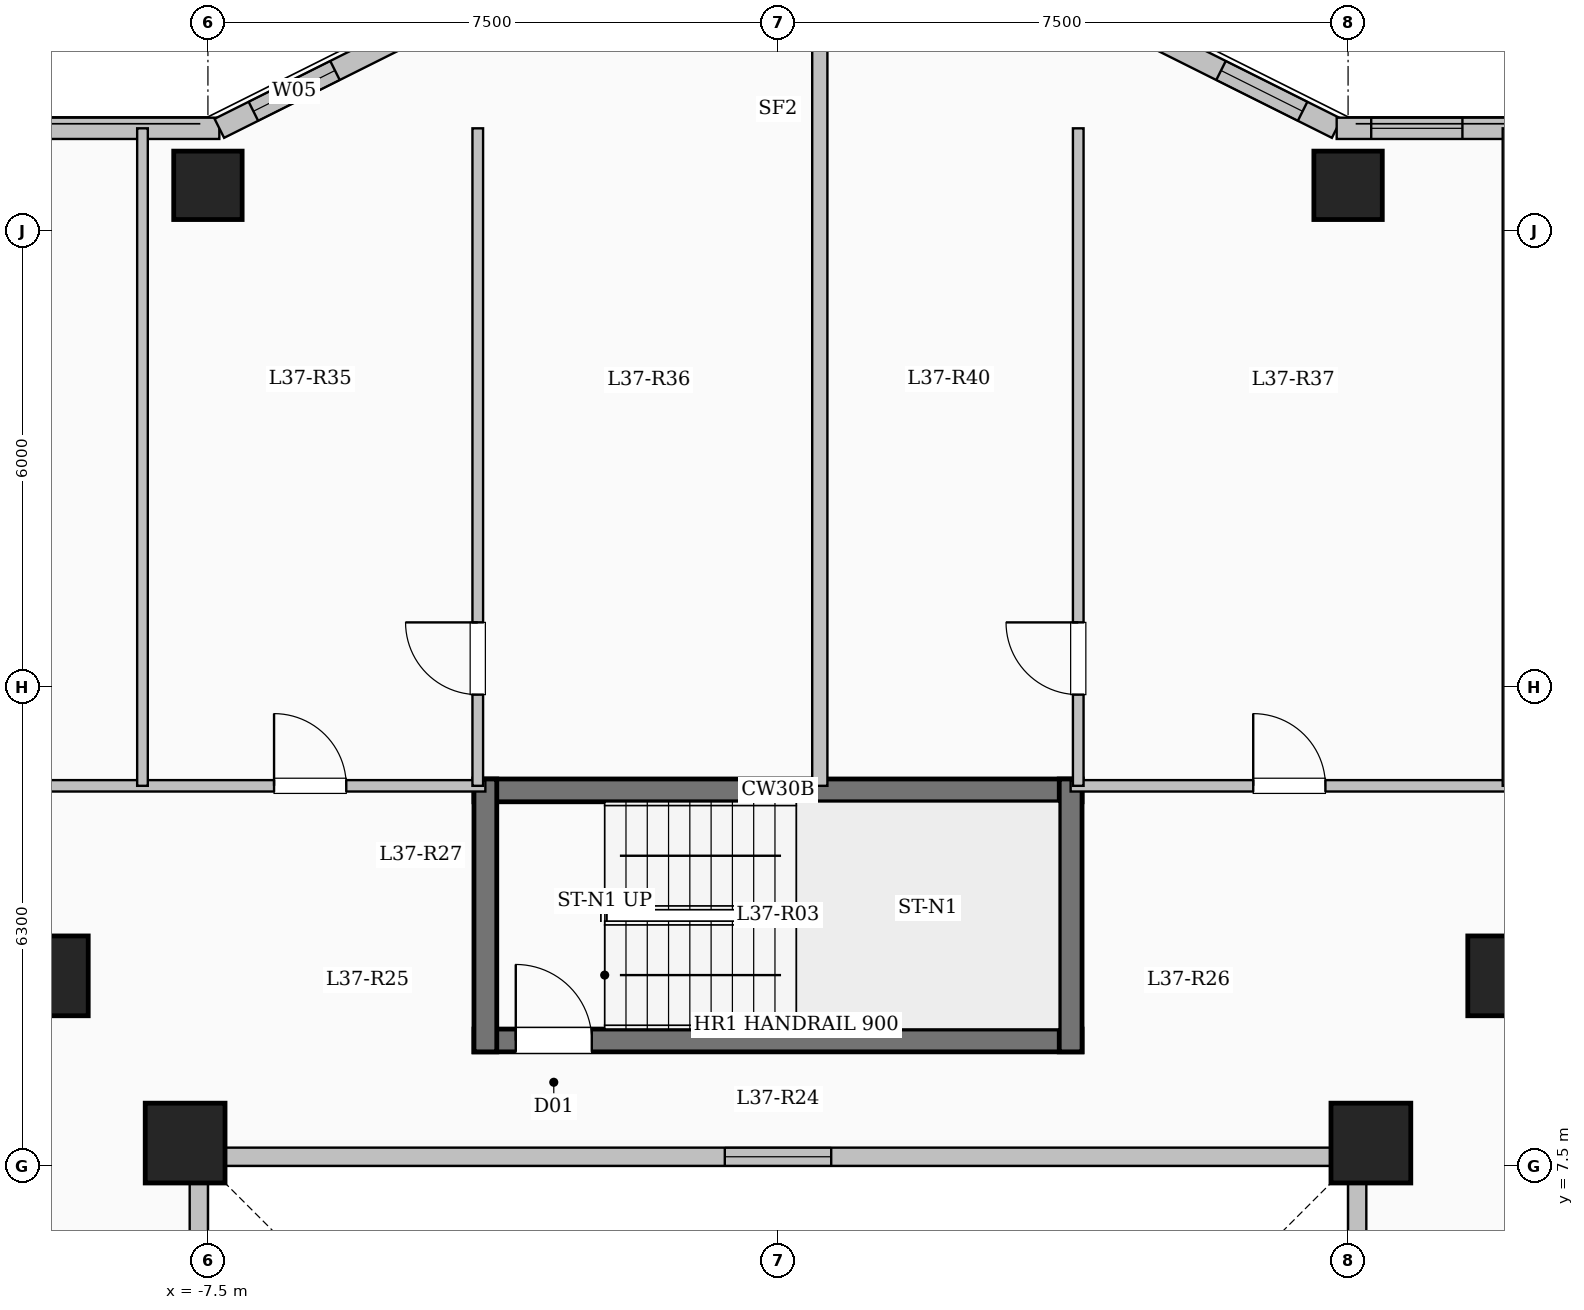
"""IFC4 building model, lengths in metres.
Left out: names, types, materials, properties, quantities, classifications, styles, units other than length and angle.
Written with IfcOpenShell. Run it as: python <this file> out.ifc"""

import sys

from ifc_helpers import new_model, si_unit, direction, frame, frame_2d, origin, origin_2d, place, context, subcontext, project, spatial, rectangle, extrude, element, fill, save


model = new_model("IFC4")
c1 = context("Model", 3, precision=1e-05, world=origin(), true_north=direction((0.0, 1.0)))
c2 = subcontext(c1, "Body", "Model", "MODEL_VIEW")
j1 = project(units=[si_unit("LENGTHUNIT", "METRE"), si_unit("PLANEANGLEUNIT", "RADIAN")], contexts=[c1])
p1 = place(None, origin())
s1 = spatial("IfcSite", under=j1, at=p1, CompositionType="ELEMENT")
p2 = place(p1, origin())
s2 = spatial("IfcBuilding", under=s1, at=p2, CompositionType="ELEMENT")
p3 = place(p2, frame((0.0, 0.0, 139.3)))
s3 = spatial("IfcBuildingStorey", under=s2, at=p3, CompositionType="ELEMENT", Elevation=139.3)
for number, where, z_axis, x_axis in (
    (1, (-7.8, 7.8, 0.0), (0.0, 0.0, 1.0), (1.0, 0.0, 0.0)),
    (2, (7.8, 7.8, 0.0), (0.0, 0.0, 1.0), (1.0, 0.0, 0.0)),
    (3, (-9.6, 10.0, 0.0), (0.0, 0.0, 1.0), (1.0, 0.0, 0.0)),
    (4, (9.6, 10.0, 0.0), (0.0, 0.0, 1.0), (1.0, 0.0, 0.0)),
):
    element("IfcColumn", number, at=place(p3, frame(where, z_axis=z_axis, x_axis=x_axis)), inside=s3, PredefinedType="COLUMN", context=c2, shape_type="SweptSolid", body=[
        extrude(rectangle(XDim=1.05, YDim=1.05, at=origin_2d()), origin(), (0.0, 0.0, 1.0), 3.35),
    ])
for number, where, z_axis, x_axis in (
    (5, (-7.5, 20.4, 0.0), (0.0, 0.0, 1.0), (1.0, 0.0, 0.0)),
    (6, (7.5, 20.4, 0.0), (0.0, 0.0, 1.0), (1.0, 0.0, 0.0)),
):
    element("IfcColumn", number, at=place(p3, frame(where, z_axis=z_axis, x_axis=x_axis)), inside=s3, PredefinedType="COLUMN", context=c2, shape_type="SweptSolid", body=[
        extrude(rectangle(XDim=0.9, YDim=0.9, at=origin_2d()), origin(), (0.0, 0.0, 1.0), 3.35),
    ])
p4 = place(p3, frame((7.62, -7.62, 0.0), z_axis=(0.0, 0.0, 1.0), x_axis=(0.0, 1.0, 0.0)))
e7 = element("IfcWall", 7, at=p4, inside=s3, PredefinedType="SOLIDWALL", context=c2, shape_type="SweptSolid", body=[
    extrude(rectangle(XDim=15.24, YDim=0.24, at=frame_2d((7.62, 0.0))), origin(), (0.0, 0.0, 1.0), 3.1),
])
p5 = place(p4, frame((6.92, 0.0, 0.95)))
e8 = element("IfcOpeningElement", 8, at=p5, cuts=e7, PredefinedType="OPENING", context=c2, shape_type="SweptSolid", body=[
    extrude(rectangle(XDim=1.4, YDim=1.5, at=frame_2d((0.7, 0.75))), frame((0.0, 0.13, 0.0), z_axis=(0.0, -1.0, 0.0), x_axis=(1.0, 0.0, 0.0)), (0.0, 0.0, 1.0), 0.26),
])
p6 = place(p3, frame((7.62, 7.62, 0.0), z_axis=(0.0, 0.0, 1.0), x_axis=(-1.0, 0.0, 0.0)))
e9 = element("IfcWall", 9, at=p6, inside=s3, PredefinedType="SOLIDWALL", context=c2, shape_type="SweptSolid", body=[
    extrude(rectangle(XDim=15.24, YDim=0.24, at=frame_2d((7.62, 0.0))), origin(), (0.0, 0.0, 1.0), 3.1),
])
p7 = place(p6, frame((6.92, 0.0, 0.95)))
e10 = element("IfcOpeningElement", 10, at=p7, cuts=e9, PredefinedType="OPENING", context=c2, shape_type="SweptSolid", body=[
    extrude(rectangle(XDim=1.4, YDim=1.5, at=frame_2d((0.7, 0.75))), frame((0.0, 0.13, 0.0), z_axis=(0.0, -1.0, 0.0), x_axis=(1.0, 0.0, 0.0)), (0.0, 0.0, 1.0), 0.26),
])
p8 = place(p3, frame((-7.62, 7.62, 0.0), z_axis=(0.0, 0.0, 1.0), x_axis=(0.0, -1.0, 0.0)))
e11 = element("IfcWall", 11, at=p8, inside=s3, PredefinedType="SOLIDWALL", context=c2, shape_type="SweptSolid", body=[
    extrude(rectangle(XDim=15.24, YDim=0.24, at=frame_2d((7.62, 0.0))), origin(), (0.0, 0.0, 1.0), 3.1),
])
p9 = place(p8, frame((6.92, 0.0, 0.95)))
e12 = element("IfcOpeningElement", 12, at=p9, cuts=e11, PredefinedType="OPENING", context=c2, shape_type="SweptSolid", body=[
    extrude(rectangle(XDim=1.4, YDim=1.5, at=frame_2d((0.7, 0.75))), frame((0.0, 0.13, 0.0), z_axis=(0.0, -1.0, 0.0), x_axis=(1.0, 0.0, 0.0)), (0.0, 0.0, 1.0), 0.26),
])
p10 = place(p3, frame((-19.65, 21.15, 0.0), z_axis=(0.0, 0.0, 1.0), x_axis=(1.0, 0.0, 0.0)))
e13 = element("IfcWall", 13, at=p10, inside=s3, PredefinedType="SOLIDWALL", context=c2, shape_type="SweptSolid", body=[
    extrude(rectangle(XDim=12.3, YDim=0.28, at=frame_2d((6.15, 0.0))), origin(), (0.0, 0.0, 1.0), 3.1),
])
p11 = place(p10, frame((1.862, 0.0, 0.9)))
e14 = element("IfcOpeningElement", 14, at=p11, cuts=e13, PredefinedType="OPENING", context=c2, shape_type="SweptSolid", body=[
    extrude(rectangle(XDim=2.0, YDim=1.7, at=frame_2d((1.0, 0.85))), frame((0.0, 0.15, 0.0), z_axis=(0.0, -1.0, 0.0), x_axis=(1.0, 0.0, 0.0)), (0.0, 0.0, 1.0), 0.3),
])
p12 = place(p10, frame((7.485, 0.0, 0.9)))
e15 = element("IfcOpeningElement", 15, at=p12, cuts=e13, PredefinedType="OPENING", context=c2, shape_type="SweptSolid", body=[
    extrude(rectangle(XDim=2.0, YDim=1.7, at=frame_2d((1.0, 0.85))), frame((0.0, 0.15, 0.0), z_axis=(0.0, -1.0, 0.0), x_axis=(1.0, 0.0, 0.0)), (0.0, 0.0, 1.0), 0.3),
])
p13 = place(p3, frame((-7.35, 21.15, 0.0), z_axis=(0.0, 0.0, 1.0), x_axis=(0.894427191, 0.4472135955, 0.0)))
e16 = element("IfcWall", 16, at=p13, inside=s3, PredefinedType="SOLIDWALL", context=c2, shape_type="SweptSolid", body=[
    extrude(rectangle(XDim=3.354, YDim=0.28, at=frame_2d((1.677, 0.0))), origin(), (0.0, 0.0, 1.0), 3.1),
])
p14 = place(p13, frame((0.501, 0.0, 0.95)))
e17 = element("IfcOpeningElement", 17, at=p14, cuts=e16, PredefinedType="OPENING", context=c2, shape_type="SweptSolid", body=[
    extrude(rectangle(XDim=1.2, YDim=1.5, at=frame_2d((0.6, 0.75))), frame((0.0, 0.15, 0.0), z_axis=(0.0, -1.0, 0.0), x_axis=(1.0, 0.0, 0.0)), (0.0, 0.0, 1.0), 0.3),
])
p15 = place(p3, frame((4.35, 22.65, 0.0), z_axis=(0.0, 0.0, 1.0), x_axis=(0.894427191, -0.4472135955, 0.0)))
e18 = element("IfcWall", 18, at=p15, inside=s3, PredefinedType="SOLIDWALL", context=c2, shape_type="SweptSolid", body=[
    extrude(rectangle(XDim=3.354, YDim=0.28, at=frame_2d((1.677, 0.0))), origin(), (0.0, 0.0, 1.0), 3.1),
])
p16 = place(p15, frame((1.653, 0.0, 0.95)))
e19 = element("IfcOpeningElement", 19, at=p16, cuts=e18, PredefinedType="OPENING", context=c2, shape_type="SweptSolid", body=[
    extrude(rectangle(XDim=1.2, YDim=1.5, at=frame_2d((0.6, 0.75))), frame((0.0, 0.15, 0.0), z_axis=(0.0, -1.0, 0.0), x_axis=(1.0, 0.0, 0.0)), (0.0, 0.0, 1.0), 0.3),
])
p17 = place(p3, frame((7.35, 21.15, 0.0), z_axis=(0.0, 0.0, 1.0), x_axis=(1.0, 0.0, 0.0)))
e20 = element("IfcWall", 20, at=p17, inside=s3, PredefinedType="SOLIDWALL", context=c2, shape_type="SweptSolid", body=[
    extrude(rectangle(XDim=12.3, YDim=0.28, at=frame_2d((6.15, 0.0))), origin(), (0.0, 0.0, 1.0), 3.1),
])
p18 = place(p17, frame((0.454, 0.0, 0.95)))
e21 = element("IfcOpeningElement", 21, at=p18, cuts=e20, PredefinedType="OPENING", context=c2, shape_type="SweptSolid", body=[
    extrude(rectangle(XDim=1.2, YDim=1.5, at=frame_2d((0.6, 0.75))), frame((0.0, 0.15, 0.0), z_axis=(0.0, -1.0, 0.0), x_axis=(1.0, 0.0, 0.0)), (0.0, 0.0, 1.0), 0.3),
])
p19 = place(p17, frame((4.045, 0.0, 0.9)))
e22 = element("IfcOpeningElement", 22, at=p19, cuts=e20, PredefinedType="OPENING", context=c2, shape_type="SweptSolid", body=[
    extrude(rectangle(XDim=2.0, YDim=1.7, at=frame_2d((1.0, 0.85))), frame((0.0, 0.15, 0.0), z_axis=(0.0, -1.0, 0.0), x_axis=(1.0, 0.0, 0.0)), (0.0, 0.0, 1.0), 0.3),
])
p20 = place(p17, frame((9.066, 0.0, 0.9)))
e23 = element("IfcOpeningElement", 23, at=p20, cuts=e20, PredefinedType="OPENING", context=c2, shape_type="SweptSolid", body=[
    extrude(rectangle(XDim=2.0, YDim=1.7, at=frame_2d((1.0, 0.85))), frame((0.0, 0.15, 0.0), z_axis=(0.0, -1.0, 0.0), x_axis=(1.0, 0.0, 0.0)), (0.0, 0.0, 1.0), 0.3),
])
p21 = place(p3, frame((-4.0, 12.44, 0.0), z_axis=(0.0, 0.0, 1.0), x_axis=(1.0, 0.0, 0.0)))
e24 = element("IfcWall", 24, at=p21, inside=s3, PredefinedType="SHEAR", context=c2, shape_type="SweptSolid", body=[
    extrude(rectangle(XDim=8.0, YDim=0.3, at=frame_2d((4.0, 0.0))), origin(), (0.0, 0.0, 1.0), 3.35),
])
p22 = place(p3, frame((-4.0, 9.15, 0.0), z_axis=(0.0, 0.0, 1.0), x_axis=(1.0, 0.0, 0.0)))
e25 = element("IfcWall", 25, at=p22, inside=s3, PredefinedType="SHEAR", context=c2, shape_type="SweptSolid", body=[
    extrude(rectangle(XDim=8.0, YDim=0.3, at=frame_2d((4.0, 0.0))), origin(), (0.0, 0.0, 1.0), 3.35),
])
p23 = place(p22, frame((0.55, 0.0, 0.0)))
e26 = element("IfcOpeningElement", 26, at=p23, cuts=e25, PredefinedType="OPENING", context=c2, shape_type="SweptSolid", body=[
    extrude(rectangle(XDim=1.0, YDim=2.15, at=frame_2d((0.5, 1.075))), frame((0.0, 0.16, 0.0), z_axis=(0.0, -1.0, 0.0), x_axis=(1.0, 0.0, 0.0)), (0.0, 0.0, 1.0), 0.32),
])
for number, where, z_axis, x_axis in (
    (27, (-3.85, 9.0, 0.0), (0.0, 0.0, 1.0), (0.0, 1.0, 0.0)),
    (28, (3.85, 9.0, 0.0), (0.0, 0.0, 1.0), (0.0, 1.0, 0.0)),
):
    element("IfcWall", number, at=place(p3, frame(where, z_axis=z_axis, x_axis=x_axis)), inside=s3, PredefinedType="SHEAR", context=c2, shape_type="SweptSolid", body=[
        extrude(rectangle(XDim=3.59, YDim=0.3, at=frame_2d((1.795, 0.0))), origin(), (0.0, 0.0, 1.0), 3.35),
    ])
p24 = place(p3, frame((-19.55, 12.5, 0.0), z_axis=(0.0, 0.0, 1.0), x_axis=(1.0, 0.0, 0.0)))
e29 = element("IfcWall", 29, at=p24, inside=s3, PredefinedType="PARTITIONING", context=c2, shape_type="SweptSolid", body=[
    extrude(rectangle(XDim=15.7, YDim=0.15, at=frame_2d((7.85, 0.0))), origin(), (0.0, 0.0, 1.0), 3.1),
])
p25 = place(p24, frame((2.292, 0.0, 0.0)))
e30 = element("IfcOpeningElement", 30, at=p25, cuts=e29, PredefinedType="OPENING", context=c2, shape_type="SweptSolid", body=[
    extrude(rectangle(XDim=0.95, YDim=2.15, at=frame_2d((0.475, 1.075))), frame((0.0, 0.085, 0.0), z_axis=(0.0, -1.0, 0.0), x_axis=(1.0, 0.0, 0.0)), (0.0, 0.0, 1.0), 0.17),
])
p26 = place(p24, frame((7.917, 0.0, 0.0)))
e31 = element("IfcOpeningElement", 31, at=p26, cuts=e29, PredefinedType="OPENING", context=c2, shape_type="SweptSolid", body=[
    extrude(rectangle(XDim=0.95, YDim=2.15, at=frame_2d((0.475, 1.075))), frame((0.0, 0.085, 0.0), z_axis=(0.0, -1.0, 0.0), x_axis=(1.0, 0.0, 0.0)), (0.0, 0.0, 1.0), 0.17),
])
p27 = place(p24, frame((12.92, 0.0, 0.0)))
e32 = element("IfcOpeningElement", 32, at=p27, cuts=e29, PredefinedType="OPENING", context=c2, shape_type="SweptSolid", body=[
    extrude(rectangle(XDim=0.95, YDim=2.15, at=frame_2d((0.475, 1.075))), frame((0.0, 0.085, 0.0), z_axis=(0.0, -1.0, 0.0), x_axis=(1.0, 0.0, 0.0)), (0.0, 0.0, 1.0), 0.17),
])
p28 = place(p3, frame((3.85, 12.5, 0.0), z_axis=(0.0, 0.0, 1.0), x_axis=(1.0, 0.0, 0.0)))
e33 = element("IfcWall", 33, at=p28, inside=s3, PredefinedType="PARTITIONING", context=c2, shape_type="SweptSolid", body=[
    extrude(rectangle(XDim=15.7, YDim=0.15, at=frame_2d((7.85, 0.0))), origin(), (0.0, 0.0, 1.0), 3.1),
])
p29 = place(p28, frame((2.402, 0.0, 0.0)))
e34 = element("IfcOpeningElement", 34, at=p29, cuts=e33, PredefinedType="OPENING", context=c2, shape_type="SweptSolid", body=[
    extrude(rectangle(XDim=0.95, YDim=2.15, at=frame_2d((0.475, 1.075))), frame((0.0, 0.085, 0.0), z_axis=(0.0, -1.0, 0.0), x_axis=(1.0, 0.0, 0.0)), (0.0, 0.0, 1.0), 0.17),
])
p30 = place(p28, frame((8.026, 0.0, 0.0)))
e35 = element("IfcOpeningElement", 35, at=p30, cuts=e33, PredefinedType="OPENING", context=c2, shape_type="SweptSolid", body=[
    extrude(rectangle(XDim=0.95, YDim=2.15, at=frame_2d((0.475, 1.075))), frame((0.0, 0.085, 0.0), z_axis=(0.0, -1.0, 0.0), x_axis=(1.0, 0.0, 0.0)), (0.0, 0.0, 1.0), 0.17),
])
p31 = place(p28, frame((13.03, 0.0, 0.0)))
e36 = element("IfcOpeningElement", 36, at=p31, cuts=e33, PredefinedType="OPENING", context=c2, shape_type="SweptSolid", body=[
    extrude(rectangle(XDim=0.95, YDim=2.15, at=frame_2d((0.475, 1.075))), frame((0.0, 0.085, 0.0), z_axis=(0.0, -1.0, 0.0), x_axis=(1.0, 0.0, 0.0)), (0.0, 0.0, 1.0), 0.17),
])
p32 = place(p3, frame((0.55, 12.5, 0.0), z_axis=(0.0, 0.0, 1.0), x_axis=(0.0, 1.0, 0.0)))
e37 = element("IfcWall", 37, at=p32, inside=s3, PredefinedType="SOLIDWALL", context=c2, shape_type="SweptSolid", body=[
    extrude(rectangle(XDim=10.18, YDim=0.2, at=frame_2d((5.09, 0.0))), origin(), (0.0, 0.0, 1.0), 3.1),
])
p33 = place(p3, frame((-3.95, 12.5, 0.0), z_axis=(0.0, 0.0, 1.0), x_axis=(0.0, 1.0, 0.0)))
e38 = element("IfcWall", 38, at=p33, inside=s3, PredefinedType="PARTITIONING", context=c2, shape_type="SweptSolid", body=[
    extrude(rectangle(XDim=8.65, YDim=0.14, at=frame_2d((4.325, 0.0))), origin(), (0.0, 0.0, 1.0), 3.1),
])
p34 = place(p33, frame((1.2, 0.0, 0.0)))
e39 = element("IfcOpeningElement", 39, at=p34, cuts=e38, PredefinedType="OPENING", context=c2, shape_type="SweptSolid", body=[
    extrude(rectangle(XDim=0.95, YDim=2.15, at=frame_2d((0.475, 1.075))), frame((0.0, 0.08, 0.0), z_axis=(0.0, -1.0, 0.0), x_axis=(1.0, 0.0, 0.0)), (0.0, 0.0, 1.0), 0.16),
])
p35 = place(p3, frame((-8.361, 12.5, 0.0), z_axis=(0.0, 0.0, 1.0), x_axis=(0.0, 1.0, 0.0)))
e40 = element("IfcWall", 40, at=p35, inside=s3, PredefinedType="PARTITIONING", context=c2, shape_type="SweptSolid", body=[
    extrude(rectangle(XDim=8.65, YDim=0.14, at=frame_2d((4.325, 0.0))), origin(), (0.0, 0.0, 1.0), 3.1),
])
p36 = place(p3, frame((3.95, 12.5, 0.0), z_axis=(0.0, 0.0, 1.0), x_axis=(0.0, 1.0, 0.0)))
e41 = element("IfcWall", 41, at=p36, inside=s3, PredefinedType="PARTITIONING", context=c2, shape_type="SweptSolid", body=[
    extrude(rectangle(XDim=8.65, YDim=0.14, at=frame_2d((4.325, 0.0))), origin(), (0.0, 0.0, 1.0), 3.1),
])
p37 = place(p36, frame((1.2, 0.0, 0.0)))
e42 = element("IfcOpeningElement", 42, at=p37, cuts=e41, PredefinedType="OPENING", context=c2, shape_type="SweptSolid", body=[
    extrude(rectangle(XDim=0.95, YDim=2.15, at=frame_2d((0.475, 1.075))), frame((0.0, 0.08, 0.0), z_axis=(0.0, -1.0, 0.0), x_axis=(1.0, 0.0, 0.0)), (0.0, 0.0, 1.0), 0.16),
])
p38 = place(p3, frame((9.604, 12.5, 0.0), z_axis=(0.0, 0.0, 1.0), x_axis=(0.0, 1.0, 0.0)))
e43 = element("IfcWall", 43, at=p38, inside=s3, PredefinedType="PARTITIONING", context=c2, shape_type="SweptSolid", body=[
    extrude(rectangle(XDim=8.65, YDim=0.14, at=frame_2d((4.325, 0.0))), origin(), (0.0, 0.0, 1.0), 3.1),
])
p39 = place(p7, origin())
e44 = element("IfcWindow", 44, at=p39, inside=s3, PartitioningType="SINGLE_PANEL", PredefinedType="WINDOW", context=c2, shape_type="SweptSolid", body=[
    extrude(rectangle(XDim=1.4, YDim=1.5, at=frame_2d((0.7, 0.75))), frame((0.0, 0.03, 0.0), z_axis=(0.0, -1.0, 0.0), x_axis=(1.0, 0.0, 0.0)), (0.0, 0.0, 1.0), 0.06),
])
fill(e10, e44)
p40 = place(p14, origin())
e45 = element("IfcWindow", 45, at=p40, inside=s3, PartitioningType="SINGLE_PANEL", PredefinedType="WINDOW", context=c2, shape_type="SweptSolid", body=[
    extrude(rectangle(XDim=1.2, YDim=1.5, at=frame_2d((0.6, 0.75))), frame((0.0, 0.03, 0.0), z_axis=(0.0, -1.0, 0.0), x_axis=(1.0, 0.0, 0.0)), (0.0, 0.0, 1.0), 0.06),
])
fill(e17, e45)
p41 = place(p16, origin())
e46 = element("IfcWindow", 46, at=p41, inside=s3, PartitioningType="SINGLE_PANEL", PredefinedType="WINDOW", context=c2, shape_type="SweptSolid", body=[
    extrude(rectangle(XDim=1.2, YDim=1.5, at=frame_2d((0.6, 0.75))), frame((0.0, 0.03, 0.0), z_axis=(0.0, -1.0, 0.0), x_axis=(1.0, 0.0, 0.0)), (0.0, 0.0, 1.0), 0.06),
])
fill(e19, e46)
p42 = place(p18, origin())
e47 = element("IfcWindow", 47, at=p42, inside=s3, PartitioningType="SINGLE_PANEL", PredefinedType="WINDOW", context=c2, shape_type="SweptSolid", body=[
    extrude(rectangle(XDim=1.2, YDim=1.5, at=frame_2d((0.6, 0.75))), frame((0.0, 0.03, 0.0), z_axis=(0.0, -1.0, 0.0), x_axis=(1.0, 0.0, 0.0)), (0.0, 0.0, 1.0), 0.06),
])
fill(e21, e47)
p43 = place(p23, origin())
e48 = element("IfcDoor", 48, at=p43, inside=s3, OperationType="SINGLE_SWING_LEFT", PredefinedType="DOOR", context=c2, shape_type="SweptSolid", body=[
    extrude(rectangle(XDim=1.0, YDim=2.15, at=frame_2d((0.5, 1.075))), frame((0.0, 0.025, 0.0), z_axis=(0.0, -1.0, 0.0), x_axis=(1.0, 0.0, 0.0)), (0.0, 0.0, 1.0), 0.05),
])
fill(e26, e48)
p44 = place(p27, origin())
e49 = element("IfcDoor", 49, at=p44, inside=s3, OperationType="SINGLE_SWING_LEFT", PredefinedType="DOOR", context=c2, shape_type="SweptSolid", body=[
    extrude(rectangle(XDim=0.95, YDim=2.15, at=frame_2d((0.475, 1.075))), frame((0.0, 0.025, 0.0), z_axis=(0.0, -1.0, 0.0), x_axis=(1.0, 0.0, 0.0)), (0.0, 0.0, 1.0), 0.05),
])
fill(e32, e49)
p45 = place(p34, origin())
e50 = element("IfcDoor", 50, at=p45, inside=s3, OperationType="SINGLE_SWING_RIGHT", PredefinedType="DOOR", context=c2, shape_type="SweptSolid", body=[
    extrude(rectangle(XDim=0.95, YDim=2.15, at=frame_2d((0.475, 1.075))), frame((0.0, 0.025, 0.0), z_axis=(0.0, -1.0, 0.0), x_axis=(1.0, 0.0, 0.0)), (0.0, 0.0, 1.0), 0.05),
])
fill(e39, e50)
p46 = place(p29, origin())
e51 = element("IfcDoor", 51, at=p46, inside=s3, OperationType="SINGLE_SWING_LEFT", PredefinedType="DOOR", context=c2, shape_type="SweptSolid", body=[
    extrude(rectangle(XDim=0.95, YDim=2.15, at=frame_2d((0.475, 1.075))), frame((0.0, 0.025, 0.0), z_axis=(0.0, -1.0, 0.0), x_axis=(1.0, 0.0, 0.0)), (0.0, 0.0, 1.0), 0.05),
])
fill(e34, e51)
p47 = place(p37, origin())
e52 = element("IfcDoor", 52, at=p47, inside=s3, OperationType="SINGLE_SWING_RIGHT", PredefinedType="DOOR", context=c2, shape_type="SweptSolid", body=[
    extrude(rectangle(XDim=0.95, YDim=2.15, at=frame_2d((0.475, 1.075))), frame((0.0, 0.025, 0.0), z_axis=(0.0, -1.0, 0.0), x_axis=(1.0, 0.0, 0.0)), (0.0, 0.0, 1.0), 0.05),
])
fill(e42, e52)
save(model, sys.argv[1])
